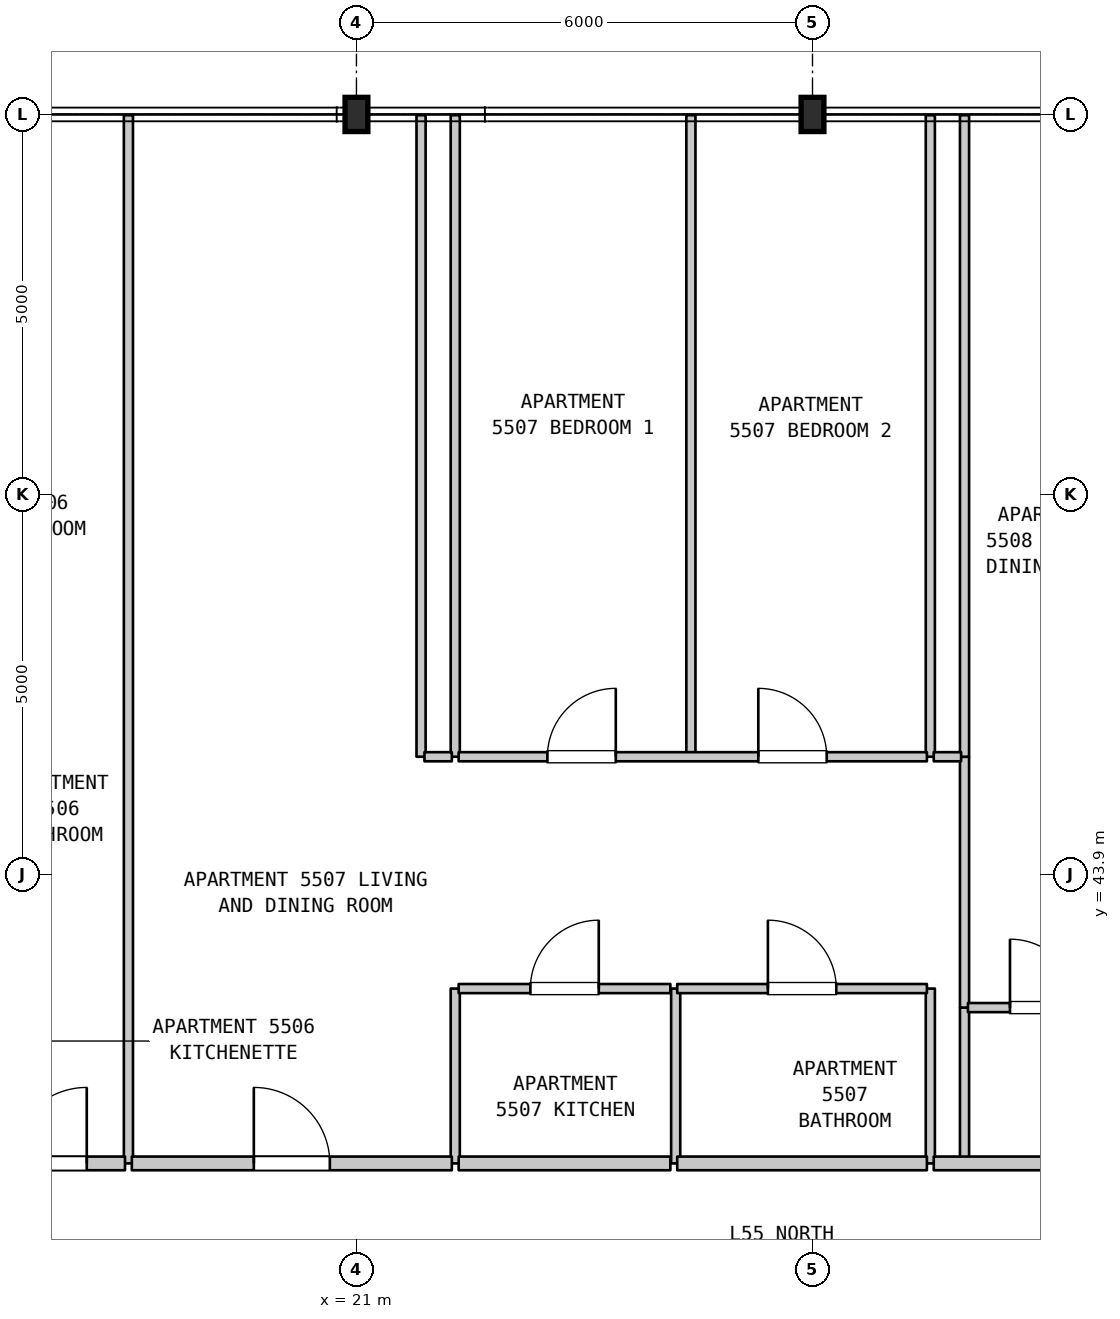
"""IFC4 building model, lengths in metres.
Left out: names, types, materials, properties, quantities, classifications, styles, units other than length and angle.
Written with IfcOpenShell. Run it as: python <this file> out.ifc"""

import sys

from ifc_helpers import new_model, si_unit, direction, frame, frame_2d, origin, origin_2d, place, context, subcontext, project, spatial, rectangle, i_section, extrude, element, fill, save


model = new_model("IFC4")
c1 = context("Model", 3, precision=1e-05, world=origin(), true_north=direction((0.0, 1.0)))
c2 = subcontext(c1, "Body", "Model", "MODEL_VIEW")
j1 = project(units=[si_unit("LENGTHUNIT", "METRE"), si_unit("PLANEANGLEUNIT", "RADIAN")], contexts=[c1])
p1 = place(None, origin())
s1 = spatial("IfcSite", under=j1, at=p1, CompositionType="ELEMENT")
p2 = place(p1, origin())
s2 = spatial("IfcBuilding", under=s1, at=p2, CompositionType="ELEMENT")
p3 = place(p2, frame((0.0, 0.0, 222.8)))
s3 = spatial("IfcBuildingStorey", under=s2, at=p3, CompositionType="ELEMENT", Elevation=222.8)
for number, where, z_axis, x_axis in (
    (1, (21.0, 53.9, 0.0), (0.0, 0.0, 1.0), (1.0, 0.0, 0.0)),
    (2, (27.0, 53.9, 0.0), (0.0, 0.0, 1.0), (1.0, 0.0, 0.0)),
):
    element("IfcColumn", number, at=place(p3, frame(where, z_axis=z_axis, x_axis=x_axis)), inside=s3, PredefinedType="COLUMN", context=c2, shape_type="SweptSolid", body=[
        extrude(i_section(OverallWidth=0.3, OverallDepth=0.45, WebThickness=0.014, FlangeThickness=0.026, FilletRadius=0.027, at=origin_2d()), origin(), (0.0, 0.0, 1.0), 3.7),
    ])
p4 = place(p3, frame((18.0, 40.1, 0.0), z_axis=(0.0, 0.0, 1.0), x_axis=(0.0, 1.0, 0.0)))
e3 = element("IfcWall", 3, at=p4, inside=s3, PredefinedType="PARTITIONING", context=c2, shape_type="SweptSolid", body=[
    extrude(rectangle(XDim=13.79, YDim=0.12, at=frame_2d((6.895, 0.0))), origin(), (0.0, 0.0, 1.0), 3.39),
])
p5 = place(p3, frame((21.85, 45.45, 0.0), z_axis=(0.0, 0.0, 1.0), x_axis=(0.0, 1.0, 0.0)))
e4 = element("IfcWall", 4, at=p5, inside=s3, PredefinedType="PARTITIONING", context=c2, shape_type="SweptSolid", body=[
    extrude(rectangle(XDim=8.44, YDim=0.12, at=frame_2d((4.22, 0.0))), origin(), (0.0, 0.0, 1.0), 3.39),
])
p6 = place(p3, frame((22.3, 40.1, 0.0), z_axis=(0.0, 0.0, 1.0), x_axis=(0.0, 1.0, 0.0)))
e5 = element("IfcWall", 5, at=p6, inside=s3, PredefinedType="PARTITIONING", context=c2, shape_type="SweptSolid", body=[
    extrude(rectangle(XDim=2.3, YDim=0.12, at=frame_2d((1.15, 0.0))), origin(), (0.0, 0.0, 1.0), 3.39),
])
p7 = place(p3, frame((22.3, 45.45, 0.0), z_axis=(0.0, 0.0, 1.0), x_axis=(0.0, 1.0, 0.0)))
e6 = element("IfcWall", 6, at=p7, inside=s3, PredefinedType="PARTITIONING", context=c2, shape_type="SweptSolid", body=[
    extrude(rectangle(XDim=8.44, YDim=0.12, at=frame_2d((4.22, 0.0))), origin(), (0.0, 0.0, 1.0), 3.39),
])
p8 = place(p3, frame((25.2, 40.1, 0.0), z_axis=(0.0, 0.0, 1.0), x_axis=(0.0, 1.0, 0.0)))
e7 = element("IfcWall", 7, at=p8, inside=s3, PredefinedType="PARTITIONING", context=c2, shape_type="SweptSolid", body=[
    extrude(rectangle(XDim=2.3, YDim=0.12, at=frame_2d((1.15, 0.0))), origin(), (0.0, 0.0, 1.0), 3.39),
])
p9 = place(p3, frame((25.4, 45.45, 0.0), z_axis=(0.0, 0.0, 1.0), x_axis=(0.0, 1.0, 0.0)))
e8 = element("IfcWall", 8, at=p9, inside=s3, PredefinedType="PARTITIONING", context=c2, shape_type="SweptSolid", body=[
    extrude(rectangle(XDim=8.44, YDim=0.12, at=frame_2d((4.22, 0.0))), origin(), (0.0, 0.0, 1.0), 3.39),
])
p10 = place(p3, frame((28.55, 40.1, 0.0), z_axis=(0.0, 0.0, 1.0), x_axis=(0.0, 1.0, 0.0)))
e9 = element("IfcWall", 9, at=p10, inside=s3, PredefinedType="PARTITIONING", context=c2, shape_type="SweptSolid", body=[
    extrude(rectangle(XDim=2.3, YDim=0.12, at=frame_2d((1.15, 0.0))), origin(), (0.0, 0.0, 1.0), 3.39),
])
p11 = place(p3, frame((28.55, 45.45, 0.0), z_axis=(0.0, 0.0, 1.0), x_axis=(0.0, 1.0, 0.0)))
e10 = element("IfcWall", 10, at=p11, inside=s3, PredefinedType="PARTITIONING", context=c2, shape_type="SweptSolid", body=[
    extrude(rectangle(XDim=8.44, YDim=0.12, at=frame_2d((4.22, 0.0))), origin(), (0.0, 0.0, 1.0), 3.39),
])
p12 = place(p3, frame((29.0, 40.1, 0.0), z_axis=(0.0, 0.0, 1.0), x_axis=(0.0, 1.0, 0.0)))
e11 = element("IfcWall", 11, at=p12, inside=s3, PredefinedType="PARTITIONING", context=c2, shape_type="SweptSolid", body=[
    extrude(rectangle(XDim=2.05, YDim=0.12, at=frame_2d((1.025, 0.0))), origin(), (0.0, 0.0, 1.0), 3.39),
])
p13 = place(p3, frame((29.0, 42.15, 0.0), z_axis=(0.0, 0.0, 1.0), x_axis=(0.0, 1.0, 0.0)))
e12 = element("IfcWall", 12, at=p13, inside=s3, PredefinedType="PARTITIONING", context=c2, shape_type="SweptSolid", body=[
    extrude(rectangle(XDim=3.3, YDim=0.12, at=frame_2d((1.65, 0.0))), origin(), (0.0, 0.0, 1.0), 3.39),
])
p14 = place(p3, frame((29.0, 45.45, 0.0), z_axis=(0.0, 0.0, 1.0), x_axis=(0.0, 1.0, 0.0)))
e13 = element("IfcWall", 13, at=p14, inside=s3, PredefinedType="PARTITIONING", context=c2, shape_type="SweptSolid", body=[
    extrude(rectangle(XDim=8.44, YDim=0.12, at=frame_2d((4.22, 0.0))), origin(), (0.0, 0.0, 1.0), 3.39),
])
p15 = place(p3, frame((16.095, 40.1, 0.0), z_axis=(0.0, 0.0, 1.0), x_axis=(1.0, 0.0, 0.0)))
e14 = element("IfcWall", 14, at=p15, inside=s3, PredefinedType="STANDARD", context=c2, shape_type="SweptSolid", body=[
    extrude(rectangle(XDim=1.86, YDim=0.18, at=frame_2d((0.93, 0.0))), origin(), (0.0, 0.0, 1.0), 3.39),
])
p16 = place(p15, frame((0.357, 0.0, 0.0)))
e15 = element("IfcOpeningElement", 15, at=p16, cuts=e14, PredefinedType="OPENING", context=c2, shape_type="SweptSolid", body=[
    extrude(rectangle(XDim=1.0, YDim=2.15, at=frame_2d((0.5, 1.075))), frame((0.0, 0.1, 0.0), z_axis=(0.0, -1.0, 0.0), x_axis=(1.0, 0.0, 0.0)), (0.0, 0.0, 1.0), 0.2),
])
p17 = place(p3, frame((18.045, 40.1, 0.0), z_axis=(0.0, 0.0, 1.0), x_axis=(1.0, 0.0, 0.0)))
e16 = element("IfcWall", 16, at=p17, inside=s3, PredefinedType="STANDARD", context=c2, shape_type="SweptSolid", body=[
    extrude(rectangle(XDim=4.21, YDim=0.18, at=frame_2d((2.105, 0.0))), origin(), (0.0, 0.0, 1.0), 3.39),
])
p18 = place(p17, frame((1.605, 0.0, 0.0)))
e17 = element("IfcOpeningElement", 17, at=p18, cuts=e16, PredefinedType="OPENING", context=c2, shape_type="SweptSolid", body=[
    extrude(rectangle(XDim=1.0, YDim=2.15, at=frame_2d((0.5, 1.075))), frame((0.0, 0.1, 0.0), z_axis=(0.0, -1.0, 0.0), x_axis=(1.0, 0.0, 0.0)), (0.0, 0.0, 1.0), 0.2),
])
p19 = place(p3, frame((22.345, 40.1, 0.0), z_axis=(0.0, 0.0, 1.0), x_axis=(1.0, 0.0, 0.0)))
e18 = element("IfcWall", 18, at=p19, inside=s3, PredefinedType="STANDARD", context=c2, shape_type="SweptSolid", body=[
    extrude(rectangle(XDim=2.785, YDim=0.18, at=frame_2d((1.393, 0.0))), origin(), (0.0, 0.0, 1.0), 3.39),
])
p20 = place(p3, frame((25.22, 40.1, 0.0), z_axis=(0.0, 0.0, 1.0), x_axis=(1.0, 0.0, 0.0)))
e19 = element("IfcWall", 19, at=p20, inside=s3, PredefinedType="STANDARD", context=c2, shape_type="SweptSolid", body=[
    extrude(rectangle(XDim=3.285, YDim=0.18, at=frame_2d((1.643, 0.0))), origin(), (0.0, 0.0, 1.0), 3.39),
])
p21 = place(p3, frame((28.595, 40.1, 0.0), z_axis=(0.0, 0.0, 1.0), x_axis=(1.0, 0.0, 0.0)))
e20 = element("IfcWall", 20, at=p21, inside=s3, PredefinedType="STANDARD", context=c2, shape_type="SweptSolid", body=[
    extrude(rectangle(XDim=4.33, YDim=0.18, at=frame_2d((2.165, 0.0))), origin(), (0.0, 0.0, 1.0), 3.39),
])
p22 = place(p21, frame((1.88, 0.0, 0.0)))
e21 = element("IfcOpeningElement", 21, at=p22, cuts=e20, PredefinedType="OPENING", context=c2, shape_type="SweptSolid", body=[
    extrude(rectangle(XDim=1.0, YDim=2.15, at=frame_2d((0.5, 1.075))), frame((0.0, 0.1, 0.0), z_axis=(0.0, -1.0, 0.0), x_axis=(1.0, 0.0, 0.0)), (0.0, 0.0, 1.0), 0.2),
])
p23 = place(p3, frame((29.045, 42.15, 0.0), z_axis=(0.0, 0.0, 1.0), x_axis=(1.0, 0.0, 0.0)))
e22 = element("IfcWall", 22, at=p23, inside=s3, PredefinedType="PARTITIONING", context=c2, shape_type="SweptSolid", body=[
    extrude(rectangle(XDim=2.16, YDim=0.12, at=frame_2d((1.08, 0.0))), origin(), (0.0, 0.0, 1.0), 3.39),
])
p24 = place(p23, frame((0.553, 0.0, 0.0)))
e23 = element("IfcOpeningElement", 23, at=p24, cuts=e22, PredefinedType="OPENING", context=c2, shape_type="SweptSolid", body=[
    extrude(rectangle(XDim=0.9, YDim=2.15, at=frame_2d((0.45, 1.075))), frame((0.0, 0.07, 0.0), z_axis=(0.0, -1.0, 0.0), x_axis=(1.0, 0.0, 0.0)), (0.0, 0.0, 1.0), 0.14),
])
p25 = place(p3, frame((22.345, 42.4, 0.0), z_axis=(0.0, 0.0, 1.0), x_axis=(1.0, 0.0, 0.0)))
e24 = element("IfcWall", 24, at=p25, inside=s3, PredefinedType="PARTITIONING", context=c2, shape_type="SweptSolid", body=[
    extrude(rectangle(XDim=2.785, YDim=0.12, at=frame_2d((1.393, 0.0))), origin(), (0.0, 0.0, 1.0), 3.39),
])
p26 = place(p25, frame((0.943, 0.0, 0.0)))
e25 = element("IfcOpeningElement", 25, at=p26, cuts=e24, PredefinedType="OPENING", context=c2, shape_type="SweptSolid", body=[
    extrude(rectangle(XDim=0.9, YDim=2.15, at=frame_2d((0.45, 1.075))), frame((0.0, 0.07, 0.0), z_axis=(0.0, -1.0, 0.0), x_axis=(1.0, 0.0, 0.0)), (0.0, 0.0, 1.0), 0.14),
])
p27 = place(p3, frame((25.22, 42.4, 0.0), z_axis=(0.0, 0.0, 1.0), x_axis=(1.0, 0.0, 0.0)))
e26 = element("IfcWall", 26, at=p27, inside=s3, PredefinedType="PARTITIONING", context=c2, shape_type="SweptSolid", body=[
    extrude(rectangle(XDim=3.285, YDim=0.12, at=frame_2d((1.643, 0.0))), origin(), (0.0, 0.0, 1.0), 3.39),
])
p28 = place(p27, frame((1.193, 0.0, 0.0)))
e27 = element("IfcOpeningElement", 27, at=p28, cuts=e26, PredefinedType="OPENING", context=c2, shape_type="SweptSolid", body=[
    extrude(rectangle(XDim=0.9, YDim=2.1, at=frame_2d((0.45, 1.05))), frame((0.0, 0.07, 0.0), z_axis=(0.0, -1.0, 0.0), x_axis=(1.0, 0.0, 0.0)), (0.0, 0.0, 1.0), 0.14),
])
p29 = place(p3, frame((21.895, 45.45, 0.0), z_axis=(0.0, 0.0, 1.0), x_axis=(1.0, 0.0, 0.0)))
e28 = element("IfcWall", 28, at=p29, inside=s3, PredefinedType="PARTITIONING", context=c2, shape_type="SweptSolid", body=[
    extrude(rectangle(XDim=0.36, YDim=0.12, at=frame_2d((0.18, 0.0))), origin(), (0.0, 0.0, 1.0), 3.39),
])
p30 = place(p3, frame((22.345, 45.45, 0.0), z_axis=(0.0, 0.0, 1.0), x_axis=(1.0, 0.0, 0.0)))
e29 = element("IfcWall", 29, at=p30, inside=s3, PredefinedType="PARTITIONING", context=c2, shape_type="SweptSolid", body=[
    extrude(rectangle(XDim=6.16, YDim=0.12, at=frame_2d((3.08, 0.0))), origin(), (0.0, 0.0, 1.0), 3.39),
])
p31 = place(p30, frame((1.167, 0.0, 0.0)))
e30 = element("IfcOpeningElement", 30, at=p31, cuts=e29, PredefinedType="OPENING", context=c2, shape_type="SweptSolid", body=[
    extrude(rectangle(XDim=0.9, YDim=2.15, at=frame_2d((0.45, 1.075))), frame((0.0, 0.07, 0.0), z_axis=(0.0, -1.0, 0.0), x_axis=(1.0, 0.0, 0.0)), (0.0, 0.0, 1.0), 0.14),
])
p32 = place(p30, frame((3.942, 0.0, 0.0)))
e31 = element("IfcOpeningElement", 31, at=p32, cuts=e29, PredefinedType="OPENING", context=c2, shape_type="SweptSolid", body=[
    extrude(rectangle(XDim=0.9, YDim=2.15, at=frame_2d((0.45, 1.075))), frame((0.0, 0.07, 0.0), z_axis=(0.0, -1.0, 0.0), x_axis=(1.0, 0.0, 0.0)), (0.0, 0.0, 1.0), 0.14),
])
p33 = place(p3, frame((28.595, 45.45, 0.0), z_axis=(0.0, 0.0, 1.0), x_axis=(1.0, 0.0, 0.0)))
e32 = element("IfcWall", 32, at=p33, inside=s3, PredefinedType="PARTITIONING", context=c2, shape_type="SweptSolid", body=[
    extrude(rectangle(XDim=0.36, YDim=0.12, at=frame_2d((0.18, 0.0))), origin(), (0.0, 0.0, 1.0), 3.39),
])
p34 = place(p16, origin())
e33 = element("IfcDoor", 33, at=p34, inside=s3, OperationType="SINGLE_SWING_RIGHT", PredefinedType="DOOR", context=c2, shape_type="SweptSolid", body=[
    extrude(rectangle(XDim=1.0, YDim=2.15, at=frame_2d((0.5, 1.075))), frame((0.0, 0.025, 0.0), z_axis=(0.0, -1.0, 0.0), x_axis=(1.0, 0.0, 0.0)), (0.0, 0.0, 1.0), 0.05),
])
fill(e15, e33)
p35 = place(p18, origin())
e34 = element("IfcDoor", 34, at=p35, inside=s3, OperationType="SINGLE_SWING_LEFT", PredefinedType="DOOR", context=c2, shape_type="SweptSolid", body=[
    extrude(rectangle(XDim=1.0, YDim=2.15, at=frame_2d((0.5, 1.075))), frame((0.0, 0.025, 0.0), z_axis=(0.0, -1.0, 0.0), x_axis=(1.0, 0.0, 0.0)), (0.0, 0.0, 1.0), 0.05),
])
fill(e17, e34)
p36 = place(p24, origin())
e35 = element("IfcDoor", 35, at=p36, inside=s3, OperationType="SINGLE_SWING_LEFT", PredefinedType="DOOR", context=c2, shape_type="SweptSolid", body=[
    extrude(rectangle(XDim=0.9, YDim=2.15, at=frame_2d((0.45, 1.075))), frame((0.0, 0.025, 0.0), z_axis=(0.0, -1.0, 0.0), x_axis=(1.0, 0.0, 0.0)), (0.0, 0.0, 1.0), 0.05),
])
fill(e23, e35)
p37 = place(p26, origin())
e36 = element("IfcDoor", 36, at=p37, inside=s3, OperationType="SINGLE_SWING_RIGHT", PredefinedType="DOOR", context=c2, shape_type="SweptSolid", body=[
    extrude(rectangle(XDim=0.9, YDim=2.15, at=frame_2d((0.45, 1.075))), frame((0.0, 0.025, 0.0), z_axis=(0.0, -1.0, 0.0), x_axis=(1.0, 0.0, 0.0)), (0.0, 0.0, 1.0), 0.05),
])
fill(e25, e36)
p38 = place(p28, origin())
e37 = element("IfcDoor", 37, at=p38, inside=s3, OperationType="SINGLE_SWING_LEFT", PredefinedType="DOOR", context=c2, shape_type="SweptSolid", body=[
    extrude(rectangle(XDim=0.9, YDim=2.1, at=frame_2d((0.45, 1.05))), frame((0.0, 0.025, 0.0), z_axis=(0.0, -1.0, 0.0), x_axis=(1.0, 0.0, 0.0)), (0.0, 0.0, 1.0), 0.05),
])
fill(e27, e37)
p39 = place(p31, origin())
e38 = element("IfcDoor", 38, at=p39, inside=s3, OperationType="SINGLE_SWING_RIGHT", PredefinedType="DOOR", context=c2, shape_type="SweptSolid", body=[
    extrude(rectangle(XDim=0.9, YDim=2.15, at=frame_2d((0.45, 1.075))), frame((0.0, 0.025, 0.0), z_axis=(0.0, -1.0, 0.0), x_axis=(1.0, 0.0, 0.0)), (0.0, 0.0, 1.0), 0.05),
])
fill(e30, e38)
p40 = place(p32, origin())
e39 = element("IfcDoor", 39, at=p40, inside=s3, OperationType="SINGLE_SWING_LEFT", PredefinedType="DOOR", context=c2, shape_type="SweptSolid", body=[
    extrude(rectangle(XDim=0.9, YDim=2.15, at=frame_2d((0.45, 1.075))), frame((0.0, 0.025, 0.0), z_axis=(0.0, -1.0, 0.0), x_axis=(1.0, 0.0, 0.0)), (0.0, 0.0, 1.0), 0.05),
])
fill(e31, e39)
save(model, sys.argv[1])
